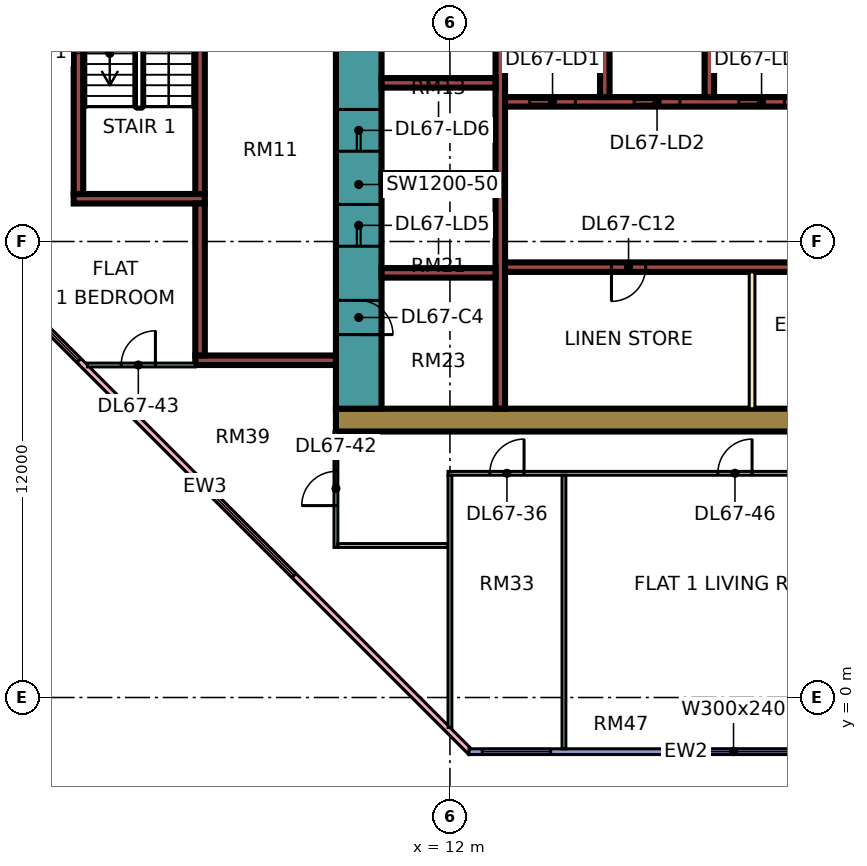
"""IFC4 building model, lengths in metres.
Left out: names, types, materials, properties, quantities, classifications, styles, units other than length and angle.
Written with IfcOpenShell. Run it as: python <this file> out.ifc"""

import sys

from ifc_helpers import new_model, si_unit, direction, frame, frame_2d, origin, place, context, subcontext, project, spatial, rectangle, extrude, element, fill, save


model = new_model("IFC4")
c1 = context("Model", 3, precision=1e-05, world=origin(), true_north=direction((0.0, 1.0)))
c2 = subcontext(c1, "Body", "Model", "MODEL_VIEW")
j1 = project(units=[si_unit("LENGTHUNIT", "METRE"), si_unit("PLANEANGLEUNIT", "RADIAN")], contexts=[c1])
p1 = place(None, origin())
s1 = spatial("IfcSite", under=j1, at=p1, CompositionType="ELEMENT")
p2 = place(p1, origin())
s2 = spatial("IfcBuilding", under=s1, at=p2, CompositionType="ELEMENT")
p3 = place(p2, frame((0.0, 0.0, 288.4)))
s3 = spatial("IfcBuildingStorey", under=s2, at=p3, CompositionType="ELEMENT", Elevation=288.4)
p4 = place(p3, frame((9.0, 7.3, 0.0), z_axis=(0.0, 0.0, 1.0), x_axis=(1.0, 0.0, 0.0)))
e1 = element("IfcWall", 1, at=p4, inside=s3, PredefinedType="SHEAR", context=c2, shape_type="SweptSolid", body=[
    extrude(rectangle(XDim=25.0, YDim=0.6, at=frame_2d((12.5, 0.0))), origin(), (0.0, 0.0, 1.0), 3.75),
])
p5 = place(p3, frame((9.6, 7.6, 0.0), z_axis=(0.0, 0.0, 1.0), x_axis=(0.0, 1.0, 0.0)))
e2 = element("IfcWall", 2, at=p5, inside=s3, PredefinedType="SHEAR", context=c2, shape_type="SweptSolid", body=[
    extrude(rectangle(XDim=11.8, YDim=1.2, at=frame_2d((5.9, 0.0))), origin(), (0.0, 0.0, 1.0), 3.75),
])
p6 = place(p5, frame((4.275, 0.0, 0.0)))
e3 = element("IfcOpeningElement", 3, at=p6, cuts=e2, PredefinedType="OPENING", context=c2, shape_type="SweptSolid", body=[
    extrude(rectangle(XDim=1.1, YDim=2.2, at=frame_2d((0.55, 1.1))), frame((0.0, 0.61, 0.0), z_axis=(0.0, -1.0, 0.0), x_axis=(1.0, 0.0, 0.0)), (0.0, 0.0, 1.0), 1.22),
])
p7 = place(p5, frame((6.775, 0.0, 0.0)))
e4 = element("IfcOpeningElement", 4, at=p7, cuts=e2, PredefinedType="OPENING", context=c2, shape_type="SweptSolid", body=[
    extrude(rectangle(XDim=1.1, YDim=2.2, at=frame_2d((0.55, 1.1))), frame((0.0, 0.61, 0.0), z_axis=(0.0, -1.0, 0.0), x_axis=(1.0, 0.0, 0.0)), (0.0, 0.0, 1.0), 1.22),
])
p8 = place(p5, frame((9.7, 0.0, 0.0)))
e5 = element("IfcOpeningElement", 5, at=p8, cuts=e2, PredefinedType="OPENING", context=c2, shape_type="SweptSolid", body=[
    extrude(rectangle(XDim=1.1, YDim=2.2, at=frame_2d((0.55, 1.1))), frame((0.0, 0.61, 0.0), z_axis=(0.0, -1.0, 0.0), x_axis=(1.0, 0.0, 0.0)), (0.0, 0.0, 1.0), 1.22),
])
p9 = place(p5, frame((1.95, 0.0, 0.0)))
e6 = element("IfcOpeningElement", 6, at=p9, cuts=e2, PredefinedType="OPENING", context=c2, shape_type="SweptSolid", body=[
    extrude(rectangle(XDim=0.9, YDim=2.1, at=frame_2d((0.45, 1.05))), frame((0.0, 0.61, 0.0), z_axis=(0.0, -1.0, 0.0), x_axis=(1.0, 0.0, 0.0)), (0.0, 0.0, 1.0), 1.22),
])
p10 = place(p3, frame((13.325, 7.6, 0.0), z_axis=(0.0, 0.0, 1.0), x_axis=(0.0, 1.0, 0.0)))
e7 = element("IfcWall", 7, at=p10, inside=s3, PredefinedType="SHEAR", context=c2, shape_type="SweptSolid", body=[
    extrude(rectangle(XDim=11.8, YDim=0.25, at=frame_2d((5.9, 0.0))), origin(), (0.0, 0.0, 1.0), 3.75),
])
p11 = place(p3, frame((13.45, 11.325, 0.0), z_axis=(0.0, 0.0, 1.0), x_axis=(1.0, 0.0, 0.0)))
e8 = element("IfcWall", 8, at=p11, inside=s3, PredefinedType="SHEAR", context=c2, shape_type="SweptSolid", body=[
    extrude(rectangle(XDim=19.95, YDim=0.25, at=frame_2d((9.975, 0.0))), origin(), (0.0, 0.0, 1.0), 3.75),
])
p12 = place(p11, frame((2.8, 0.0, 0.0)))
e9 = element("IfcOpeningElement", 9, at=p12, cuts=e8, PredefinedType="OPENING", context=c2, shape_type="SweptSolid", body=[
    extrude(rectangle(XDim=0.9, YDim=2.1, at=frame_2d((0.45, 1.05))), frame((0.0, 0.135, 0.0), z_axis=(0.0, -1.0, 0.0), x_axis=(1.0, 0.0, 0.0)), (0.0, 0.0, 1.0), 0.27),
])
p13 = place(p11, frame((8.175, 0.0, 0.0)))
e10 = element("IfcOpeningElement", 10, at=p13, cuts=e8, PredefinedType="OPENING", context=c2, shape_type="SweptSolid", body=[
    extrude(rectangle(XDim=0.9, YDim=2.1, at=frame_2d((0.45, 1.05))), frame((0.0, 0.135, 0.0), z_axis=(0.0, -1.0, 0.0), x_axis=(1.0, 0.0, 0.0)), (0.0, 0.0, 1.0), 0.27),
])
p14 = place(p11, frame((13.175, 0.0, 0.0)))
e11 = element("IfcOpeningElement", 11, at=p14, cuts=e8, PredefinedType="OPENING", context=c2, shape_type="SweptSolid", body=[
    extrude(rectangle(XDim=0.9, YDim=2.1, at=frame_2d((0.45, 1.05))), frame((0.0, 0.135, 0.0), z_axis=(0.0, -1.0, 0.0), x_axis=(1.0, 0.0, 0.0)), (0.0, 0.0, 1.0), 0.27),
])
p15 = place(p11, frame((17.65, 0.0, 0.0)))
e12 = element("IfcOpeningElement", 12, at=p15, cuts=e8, PredefinedType="OPENING", context=c2, shape_type="SweptSolid", body=[
    extrude(rectangle(XDim=0.9, YDim=2.1, at=frame_2d((0.45, 1.05))), frame((0.0, 0.135, 0.0), z_axis=(0.0, -1.0, 0.0), x_axis=(1.0, 0.0, 0.0)), (0.0, 0.0, 1.0), 0.27),
])
p16 = place(p3, frame((13.45, 15.675, 0.0), z_axis=(0.0, 0.0, 1.0), x_axis=(1.0, 0.0, 0.0)))
e13 = element("IfcWall", 13, at=p16, inside=s3, PredefinedType="SHEAR", context=c2, shape_type="SweptSolid", body=[
    extrude(rectangle(XDim=13.75, YDim=0.25, at=frame_2d((6.875, 0.0))), origin(), (0.0, 0.0, 1.0), 3.75),
])
p17 = place(p16, frame((0.65, 0.0, 0.0)))
e14 = element("IfcOpeningElement", 14, at=p17, cuts=e13, PredefinedType="OPENING", context=c2, shape_type="SweptSolid", body=[
    extrude(rectangle(XDim=1.2, YDim=2.2, at=frame_2d((0.6, 1.1))), frame((0.0, 0.135, 0.0), z_axis=(0.0, -1.0, 0.0), x_axis=(1.0, 0.0, 0.0)), (0.0, 0.0, 1.0), 0.27),
])
p18 = place(p16, frame((3.4, 0.0, 0.0)))
e15 = element("IfcOpeningElement", 15, at=p18, cuts=e13, PredefinedType="OPENING", context=c2, shape_type="SweptSolid", body=[
    extrude(rectangle(XDim=1.2, YDim=2.2, at=frame_2d((0.6, 1.1))), frame((0.0, 0.135, 0.0), z_axis=(0.0, -1.0, 0.0), x_axis=(1.0, 0.0, 0.0)), (0.0, 0.0, 1.0), 0.27),
])
p19 = place(p16, frame((6.15, 0.0, 0.0)))
e16 = element("IfcOpeningElement", 16, at=p19, cuts=e13, PredefinedType="OPENING", context=c2, shape_type="SweptSolid", body=[
    extrude(rectangle(XDim=1.2, YDim=2.2, at=frame_2d((0.6, 1.1))), frame((0.0, 0.135, 0.0), z_axis=(0.0, -1.0, 0.0), x_axis=(1.0, 0.0, 0.0)), (0.0, 0.0, 1.0), 0.27),
])
p20 = place(p16, frame((8.9, 0.0, 0.0)))
e17 = element("IfcOpeningElement", 17, at=p20, cuts=e13, PredefinedType="OPENING", context=c2, shape_type="SweptSolid", body=[
    extrude(rectangle(XDim=1.2, YDim=2.2, at=frame_2d((0.6, 1.1))), frame((0.0, 0.135, 0.0), z_axis=(0.0, -1.0, 0.0), x_axis=(1.0, 0.0, 0.0)), (0.0, 0.0, 1.0), 0.27),
])
p21 = place(p16, frame((11.8, 0.0, 0.0)))
e18 = element("IfcOpeningElement", 18, at=p21, cuts=e13, PredefinedType="OPENING", context=c2, shape_type="SweptSolid", body=[
    extrude(rectangle(XDim=0.9, YDim=2.1, at=frame_2d((0.45, 1.05))), frame((0.0, 0.135, 0.0), z_axis=(0.0, -1.0, 0.0), x_axis=(1.0, 0.0, 0.0)), (0.0, 0.0, 1.0), 0.27),
])
for number, where, z_axis, x_axis in (
    (19, (10.2, 11.175, 0.0), (0.0, 0.0, 1.0), (1.0, 0.0, 0.0)),
    (20, (10.2, 13.675, 0.0), (0.0, 0.0, 1.0), (1.0, 0.0, 0.0)),
    (21, (10.2, 16.175, 0.0), (0.0, 0.0, 1.0), (1.0, 0.0, 0.0)),
):
    element("IfcWall", number, at=place(p3, frame(where, z_axis=z_axis, x_axis=x_axis)), inside=s3, PredefinedType="SHEAR", context=c2, shape_type="SweptSolid", body=[
        extrude(rectangle(XDim=3.0, YDim=0.25, at=frame_2d((1.5, 0.0))), origin(), (0.0, 0.0, 1.0), 3.75),
    ])
for number, where, z_axis, x_axis in (
    (22, (16.075, 15.8, 0.0), (0.0, 0.0, 1.0), (0.0, 1.0, 0.0)),
    (23, (18.825, 15.8, 0.0), (0.0, 0.0, 1.0), (0.0, 1.0, 0.0)),
):
    element("IfcWall", number, at=place(p3, frame(where, z_axis=z_axis, x_axis=x_axis)), inside=s3, PredefinedType="SHEAR", context=c2, shape_type="SweptSolid", body=[
        extrude(rectangle(XDim=3.6, YDim=0.25, at=frame_2d((1.8, 0.0))), origin(), (0.0, 0.0, 1.0), 3.75),
    ])
p22 = place(p3, frame((2.1, 13.125, 0.0), z_axis=(0.0, 0.0, 1.0), x_axis=(1.0, 0.0, 0.0)))
e24 = element("IfcWall", 24, at=p22, inside=s3, PredefinedType="SHEAR", context=c2, shape_type="SweptSolid", body=[
    extrude(rectangle(XDim=3.45, YDim=0.25, at=frame_2d((1.725, 0.0))), origin(), (0.0, 0.0, 1.0), 3.75),
])
p23 = place(p3, frame((2.225, 13.25, 0.0), z_axis=(0.0, 0.0, 1.0), x_axis=(0.0, 1.0, 0.0)))
e25 = element("IfcWall", 25, at=p23, inside=s3, PredefinedType="SHEAR", context=c2, shape_type="SweptSolid", body=[
    extrude(rectangle(XDim=6.5, YDim=0.25, at=frame_2d((3.25, 0.0))), origin(), (0.0, 0.0, 1.0), 3.75),
])
p24 = place(p3, frame((5.425, 13.25, 0.0), z_axis=(0.0, 0.0, 1.0), x_axis=(0.0, 1.0, 0.0)))
e26 = element("IfcWall", 26, at=p24, inside=s3, PredefinedType="SHEAR", context=c2, shape_type="SweptSolid", body=[
    extrude(rectangle(XDim=6.5, YDim=0.25, at=frame_2d((3.25, 0.0))), origin(), (0.0, 0.0, 1.0), 3.75),
])
p25 = place(p24, frame((5.25, 0.0, 0.0)))
e27 = element("IfcOpeningElement", 27, at=p25, cuts=e26, PredefinedType="OPENING", context=c2, shape_type="SweptSolid", body=[
    extrude(rectangle(XDim=1.1, YDim=2.2, at=frame_2d((0.55, 1.1))), frame((0.0, 0.135, 0.0), z_axis=(0.0, -1.0, 0.0), x_axis=(1.0, 0.0, 0.0)), (0.0, 0.0, 1.0), 0.27),
])
p26 = place(p3, frame((5.3, 8.875, 0.0), z_axis=(0.0, 0.0, 1.0), x_axis=(1.0, 0.0, 0.0)))
e28 = element("IfcWall", 28, at=p26, inside=s3, PredefinedType="SHEAR", context=c2, shape_type="SweptSolid", body=[
    extrude(rectangle(XDim=3.7, YDim=0.25, at=frame_2d((1.85, 0.0))), origin(), (0.0, 0.0, 1.0), 3.75),
])
p27 = place(p3, frame((5.425, 9.0, 0.0), z_axis=(0.0, 0.0, 1.0), x_axis=(0.0, 1.0, 0.0)))
e29 = element("IfcWall", 29, at=p27, inside=s3, PredefinedType="SHEAR", context=c2, shape_type="SweptSolid", body=[
    extrude(rectangle(XDim=4.0, YDim=0.25, at=frame_2d((2.0, 0.0))), origin(), (0.0, 0.0, 1.0), 3.75),
])
p28 = place(p3, frame((-1.447, 12.553, 0.0), z_axis=(0.0, 0.0, 1.0), x_axis=(0.707106781187, -0.707106781187, 0.0)))
e30 = element("IfcWall", 30, at=p28, inside=s3, PredefinedType="SOLIDWALL", context=c2, shape_type="SweptSolid", body=[
    extrude(rectangle(XDim=19.799, YDim=0.15, at=frame_2d((9.899, 0.0))), origin(), (0.0, 0.0, 1.0), 3.35),
])
p29 = place(p28, frame((2.212, 0.0, 0.45)))
e31 = element("IfcOpeningElement", 31, at=p29, cuts=e30, PredefinedType="OPENING", context=c2, shape_type="SweptSolid", body=[
    extrude(rectangle(XDim=3.0, YDim=2.4, at=frame_2d((1.5, 1.2))), frame((0.0, 0.085, 0.0), z_axis=(0.0, -1.0, 0.0), x_axis=(1.0, 0.0, 0.0)), (0.0, 0.0, 1.0), 0.17),
])
p30 = place(p28, frame((10.216, 0.0, 0.45)))
e32 = element("IfcOpeningElement", 32, at=p30, cuts=e30, PredefinedType="OPENING", context=c2, shape_type="SweptSolid", body=[
    extrude(rectangle(XDim=3.0, YDim=2.4, at=frame_2d((1.5, 1.2))), frame((0.0, 0.085, 0.0), z_axis=(0.0, -1.0, 0.0), x_axis=(1.0, 0.0, 0.0)), (0.0, 0.0, 1.0), 0.17),
])
p31 = place(p3, frame((12.5, -1.425, 0.0), z_axis=(0.0, 0.0, 1.0), x_axis=(1.0, 0.0, 0.0)))
e33 = element("IfcWall", 33, at=p31, inside=s3, PredefinedType="SOLIDWALL", context=c2, shape_type="SweptSolid", body=[
    extrude(rectangle(XDim=11.425, YDim=0.15, at=frame_2d((5.712, 0.0))), origin(), (0.0, 0.0, 1.0), 3.35),
])
p32 = place(p31, frame((0.35, 0.0, 0.45)))
e34 = element("IfcOpeningElement", 34, at=p32, cuts=e33, PredefinedType="OPENING", context=c2, shape_type="SweptSolid", body=[
    extrude(rectangle(XDim=1.8, YDim=2.4, at=frame_2d((0.9, 1.2))), frame((0.0, 0.085, 0.0), z_axis=(0.0, -1.0, 0.0), x_axis=(1.0, 0.0, 0.0)), (0.0, 0.0, 1.0), 0.17),
])
p33 = place(p31, frame((5.462, 0.0, 0.45)))
e35 = element("IfcOpeningElement", 35, at=p33, cuts=e33, PredefinedType="OPENING", context=c2, shape_type="SweptSolid", body=[
    extrude(rectangle(XDim=3.0, YDim=2.4, at=frame_2d((1.5, 1.2))), frame((0.0, 0.085, 0.0), z_axis=(0.0, -1.0, 0.0), x_axis=(1.0, 0.0, 0.0)), (0.0, 0.0, 1.0), 0.17),
])
p34 = place(p3, frame((19.95, 7.6, 0.0), z_axis=(0.0, 0.0, 1.0), x_axis=(0.0, 1.0, 0.0)))
e36 = element("IfcWall", 36, at=p34, inside=s3, PredefinedType="PARTITIONING", context=c2, shape_type="SweptSolid", body=[
    extrude(rectangle(XDim=3.6, YDim=0.15, at=frame_2d((1.8, 0.0))), origin(), (0.0, 0.0, 1.0), 3.35),
])
p35 = place(p3, frame((2.461, 8.75, 0.0), z_axis=(0.0, 0.0, 1.0), x_axis=(1.0, 0.0, 0.0)))
e37 = element("IfcWall", 37, at=p35, inside=s3, PredefinedType="PARTITIONING", context=c2, shape_type="SweptSolid", body=[
    extrude(rectangle(XDim=2.839, YDim=0.1, at=frame_2d((1.419, 0.0))), origin(), (0.0, 0.0, 1.0), 3.35),
])
p36 = place(p35, frame((0.889, 0.0, 0.0)))
e38 = element("IfcOpeningElement", 38, at=p36, cuts=e37, PredefinedType="OPENING", context=c2, shape_type="SweptSolid", body=[
    extrude(rectangle(XDim=0.9, YDim=2.1, at=frame_2d((0.45, 1.05))), frame((0.0, 0.06, 0.0), z_axis=(0.0, -1.0, 0.0), x_axis=(1.0, 0.0, 0.0)), (0.0, 0.0, 1.0), 0.12),
])
p37 = place(p3, frame((9.0, 3.95, 0.0), z_axis=(0.0, 0.0, 1.0), x_axis=(0.0, 1.0, 0.0)))
e39 = element("IfcWall", 39, at=p37, inside=s3, PredefinedType="PARTITIONING", context=c2, shape_type="SweptSolid", body=[
    extrude(rectangle(XDim=3.05, YDim=0.1, at=frame_2d((1.525, 0.0))), origin(), (0.0, 0.0, 1.0), 3.35),
])
p38 = place(p37, frame((1.1, 0.0, 0.0)))
e40 = element("IfcOpeningElement", 40, at=p38, cuts=e39, PredefinedType="OPENING", context=c2, shape_type="SweptSolid", body=[
    extrude(rectangle(XDim=0.9, YDim=2.1, at=frame_2d((0.45, 1.05))), frame((0.0, 0.06, 0.0), z_axis=(0.0, -1.0, 0.0), x_axis=(1.0, 0.0, 0.0)), (0.0, 0.0, 1.0), 0.12),
])
p39 = place(p3, frame((9.05, 4.0, 0.0), z_axis=(0.0, 0.0, 1.0), x_axis=(1.0, 0.0, 0.0)))
e41 = element("IfcWall", 41, at=p39, inside=s3, PredefinedType="PARTITIONING", context=c2, shape_type="SweptSolid", body=[
    extrude(rectangle(XDim=2.9, YDim=0.1, at=frame_2d((1.45, 0.0))), origin(), (0.0, 0.0, 1.0), 3.35),
])
p40 = place(p3, frame((11.95, 5.9, 0.0), z_axis=(0.0, 0.0, 1.0), x_axis=(1.0, 0.0, 0.0)))
e42 = element("IfcWall", 42, at=p40, inside=s3, PredefinedType="PARTITIONING", context=c2, shape_type="SweptSolid", body=[
    extrude(rectangle(XDim=21.1, YDim=0.1, at=frame_2d((10.55, 0.0))), origin(), (0.0, 0.0, 1.0), 3.35),
])
p41 = place(p40, frame((1.1, 0.0, 0.0)))
e43 = element("IfcOpeningElement", 43, at=p41, cuts=e42, PredefinedType="OPENING", context=c2, shape_type="SweptSolid", body=[
    extrude(rectangle(XDim=0.9, YDim=2.1, at=frame_2d((0.45, 1.05))), frame((0.0, 0.06, 0.0), z_axis=(0.0, -1.0, 0.0), x_axis=(1.0, 0.0, 0.0)), (0.0, 0.0, 1.0), 0.12),
])
p42 = place(p40, frame((13.1, 0.0, 0.0)))
e44 = element("IfcOpeningElement", 44, at=p42, cuts=e42, PredefinedType="OPENING", context=c2, shape_type="SweptSolid", body=[
    extrude(rectangle(XDim=0.9, YDim=2.1, at=frame_2d((0.45, 1.05))), frame((0.0, 0.06, 0.0), z_axis=(0.0, -1.0, 0.0), x_axis=(1.0, 0.0, 0.0)), (0.0, 0.0, 1.0), 0.12),
])
p43 = place(p40, frame((16.1, 0.0, 0.0)))
e45 = element("IfcOpeningElement", 45, at=p43, cuts=e42, PredefinedType="OPENING", context=c2, shape_type="SweptSolid", body=[
    extrude(rectangle(XDim=0.9, YDim=2.1, at=frame_2d((0.45, 1.05))), frame((0.0, 0.06, 0.0), z_axis=(0.0, -1.0, 0.0), x_axis=(1.0, 0.0, 0.0)), (0.0, 0.0, 1.0), 0.12),
])
p44 = place(p40, frame((7.1, 0.0, 0.0)))
e46 = element("IfcOpeningElement", 46, at=p44, cuts=e42, PredefinedType="OPENING", context=c2, shape_type="SweptSolid", body=[
    extrude(rectangle(XDim=0.9, YDim=2.1, at=frame_2d((0.45, 1.05))), frame((0.0, 0.06, 0.0), z_axis=(0.0, -1.0, 0.0), x_axis=(1.0, 0.0, 0.0)), (0.0, 0.0, 1.0), 0.12),
])
p45 = place(p3, frame((12.0, -0.788, 0.0), z_axis=(0.0, 0.0, 1.0), x_axis=(0.0, 1.0, 0.0)))
e47 = element("IfcWall", 47, at=p45, inside=s3, PredefinedType="PARTITIONING", context=c2, shape_type="SweptSolid", body=[
    extrude(rectangle(XDim=6.638, YDim=0.1, at=frame_2d((3.319, 0.0))), origin(), (0.0, 0.0, 1.0), 3.35),
])
p46 = place(p3, frame((15.0, -1.35, 0.0), z_axis=(0.0, 0.0, 1.0), x_axis=(0.0, 1.0, 0.0)))
e48 = element("IfcWall", 48, at=p46, inside=s3, PredefinedType="PARTITIONING", context=c2, shape_type="SweptSolid", body=[
    extrude(rectangle(XDim=7.2, YDim=0.1, at=frame_2d((3.6, 0.0))), origin(), (0.0, 0.0, 1.0), 3.35),
])
p47 = place(p29, origin())
e49 = element("IfcWindow", 49, at=p47, inside=s3, PartitioningType="SINGLE_PANEL", PredefinedType="WINDOW", context=c2, shape_type="SweptSolid", body=[
    extrude(rectangle(XDim=3.0, YDim=2.4, at=frame_2d((1.5, 1.2))), frame((0.0, 0.03, 0.0), z_axis=(0.0, -1.0, 0.0), x_axis=(1.0, 0.0, 0.0)), (0.0, 0.0, 1.0), 0.06),
])
fill(e31, e49)
p48 = place(p30, origin())
e50 = element("IfcWindow", 50, at=p48, inside=s3, PartitioningType="SINGLE_PANEL", PredefinedType="WINDOW", context=c2, shape_type="SweptSolid", body=[
    extrude(rectangle(XDim=3.0, YDim=2.4, at=frame_2d((1.5, 1.2))), frame((0.0, 0.03, 0.0), z_axis=(0.0, -1.0, 0.0), x_axis=(1.0, 0.0, 0.0)), (0.0, 0.0, 1.0), 0.06),
])
fill(e32, e50)
p49 = place(p32, origin())
e51 = element("IfcWindow", 51, at=p49, inside=s3, PartitioningType="SINGLE_PANEL", PredefinedType="WINDOW", context=c2, shape_type="SweptSolid", body=[
    extrude(rectangle(XDim=1.8, YDim=2.4, at=frame_2d((0.9, 1.2))), frame((0.0, 0.03, 0.0), z_axis=(0.0, -1.0, 0.0), x_axis=(1.0, 0.0, 0.0)), (0.0, 0.0, 1.0), 0.06),
])
fill(e34, e51)
p50 = place(p33, origin())
e52 = element("IfcWindow", 52, at=p50, inside=s3, PartitioningType="SINGLE_PANEL", PredefinedType="WINDOW", context=c2, shape_type="SweptSolid", body=[
    extrude(rectangle(XDim=3.0, YDim=2.4, at=frame_2d((1.5, 1.2))), frame((0.0, 0.03, 0.0), z_axis=(0.0, -1.0, 0.0), x_axis=(1.0, 0.0, 0.0)), (0.0, 0.0, 1.0), 0.06),
])
fill(e35, e52)
p51 = place(p17, origin())
e53 = element("IfcDoor", 53, at=p51, inside=s3, OperationType="DOUBLE_DOOR_SLIDING", PredefinedType="DOOR", context=c2, shape_type="SweptSolid", body=[
    extrude(rectangle(XDim=1.2, YDim=2.2, at=frame_2d((0.6, 1.1))), frame((0.0, 0.025, 0.0), z_axis=(0.0, -1.0, 0.0), x_axis=(1.0, 0.0, 0.0)), (0.0, 0.0, 1.0), 0.05),
])
fill(e14, e53)
p52 = place(p18, origin())
e54 = element("IfcDoor", 54, at=p52, inside=s3, OperationType="DOUBLE_DOOR_SLIDING", PredefinedType="DOOR", context=c2, shape_type="SweptSolid", body=[
    extrude(rectangle(XDim=1.2, YDim=2.2, at=frame_2d((0.6, 1.1))), frame((0.0, 0.025, 0.0), z_axis=(0.0, -1.0, 0.0), x_axis=(1.0, 0.0, 0.0)), (0.0, 0.0, 1.0), 0.05),
])
fill(e15, e54)
p53 = place(p19, origin())
e55 = element("IfcDoor", 55, at=p53, inside=s3, OperationType="DOUBLE_DOOR_SLIDING", PredefinedType="DOOR", context=c2, shape_type="SweptSolid", body=[
    extrude(rectangle(XDim=1.2, YDim=2.2, at=frame_2d((0.6, 1.1))), frame((0.0, 0.025, 0.0), z_axis=(0.0, -1.0, 0.0), x_axis=(1.0, 0.0, 0.0)), (0.0, 0.0, 1.0), 0.05),
])
fill(e16, e55)
p54 = place(p6, origin())
e56 = element("IfcDoor", 56, at=p54, inside=s3, OperationType="DOUBLE_DOOR_SLIDING", PredefinedType="DOOR", context=c2, shape_type="SweptSolid", body=[
    extrude(rectangle(XDim=1.1, YDim=2.2, at=frame_2d((0.55, 1.1))), frame((0.0, 0.025, 0.0), z_axis=(0.0, -1.0, 0.0), x_axis=(1.0, 0.0, 0.0)), (0.0, 0.0, 1.0), 0.05),
])
fill(e3, e56)
p55 = place(p7, origin())
e57 = element("IfcDoor", 57, at=p55, inside=s3, OperationType="DOUBLE_DOOR_SLIDING", PredefinedType="DOOR", context=c2, shape_type="SweptSolid", body=[
    extrude(rectangle(XDim=1.1, YDim=2.2, at=frame_2d((0.55, 1.1))), frame((0.0, 0.025, 0.0), z_axis=(0.0, -1.0, 0.0), x_axis=(1.0, 0.0, 0.0)), (0.0, 0.0, 1.0), 0.05),
])
fill(e4, e57)
p56 = place(p9, frame((0.9, 0.0, 0.0), z_axis=(0.0, 0.0, 1.0), x_axis=(-1.0, 0.0, 0.0)))
e58 = element("IfcDoor", 58, at=p56, inside=s3, OperationType="SINGLE_SWING_LEFT", PredefinedType="DOOR", context=c2, shape_type="SweptSolid", body=[
    extrude(rectangle(XDim=0.9, YDim=2.1, at=frame_2d((0.45, 1.05))), frame((0.0, 0.025, 0.0), z_axis=(0.0, -1.0, 0.0), x_axis=(1.0, 0.0, 0.0)), (0.0, 0.0, 1.0), 0.05),
])
fill(e6, e58)
p57 = place(p12, frame((0.9, 0.0, 0.0), z_axis=(0.0, 0.0, 1.0), x_axis=(-1.0, 0.0, 0.0)))
e59 = element("IfcDoor", 59, at=p57, inside=s3, OperationType="SINGLE_SWING_LEFT", PredefinedType="DOOR", context=c2, shape_type="SweptSolid", body=[
    extrude(rectangle(XDim=0.9, YDim=2.1, at=frame_2d((0.45, 1.05))), frame((0.0, 0.025, 0.0), z_axis=(0.0, -1.0, 0.0), x_axis=(1.0, 0.0, 0.0)), (0.0, 0.0, 1.0), 0.05),
])
fill(e9, e59)
p58 = place(p41, frame((0.9, 0.0, 0.0), z_axis=(0.0, 0.0, 1.0), x_axis=(-1.0, 0.0, 0.0)))
e60 = element("IfcDoor", 60, at=p58, inside=s3, OperationType="SINGLE_SWING_RIGHT", PredefinedType="DOOR", context=c2, shape_type="SweptSolid", body=[
    extrude(rectangle(XDim=0.9, YDim=2.1, at=frame_2d((0.45, 1.05))), frame((0.0, 0.025, 0.0), z_axis=(0.0, -1.0, 0.0), x_axis=(1.0, 0.0, 0.0)), (0.0, 0.0, 1.0), 0.05),
])
fill(e43, e60)
p59 = place(p38, origin())
e61 = element("IfcDoor", 61, at=p59, inside=s3, OperationType="SINGLE_SWING_LEFT", PredefinedType="DOOR", context=c2, shape_type="SweptSolid", body=[
    extrude(rectangle(XDim=0.9, YDim=2.1, at=frame_2d((0.45, 1.05))), frame((0.0, 0.025, 0.0), z_axis=(0.0, -1.0, 0.0), x_axis=(1.0, 0.0, 0.0)), (0.0, 0.0, 1.0), 0.05),
])
fill(e40, e61)
p60 = place(p36, frame((0.9, 0.0, 0.0), z_axis=(0.0, 0.0, 1.0), x_axis=(-1.0, 0.0, 0.0)))
e62 = element("IfcDoor", 62, at=p60, inside=s3, OperationType="SINGLE_SWING_RIGHT", PredefinedType="DOOR", context=c2, shape_type="SweptSolid", body=[
    extrude(rectangle(XDim=0.9, YDim=2.1, at=frame_2d((0.45, 1.05))), frame((0.0, 0.025, 0.0), z_axis=(0.0, -1.0, 0.0), x_axis=(1.0, 0.0, 0.0)), (0.0, 0.0, 1.0), 0.05),
])
fill(e38, e62)
p61 = place(p44, frame((0.9, 0.0, 0.0), z_axis=(0.0, 0.0, 1.0), x_axis=(-1.0, 0.0, 0.0)))
e63 = element("IfcDoor", 63, at=p61, inside=s3, OperationType="SINGLE_SWING_RIGHT", PredefinedType="DOOR", context=c2, shape_type="SweptSolid", body=[
    extrude(rectangle(XDim=0.9, YDim=2.1, at=frame_2d((0.45, 1.05))), frame((0.0, 0.025, 0.0), z_axis=(0.0, -1.0, 0.0), x_axis=(1.0, 0.0, 0.0)), (0.0, 0.0, 1.0), 0.05),
])
fill(e46, e63)
save(model, sys.argv[1])
